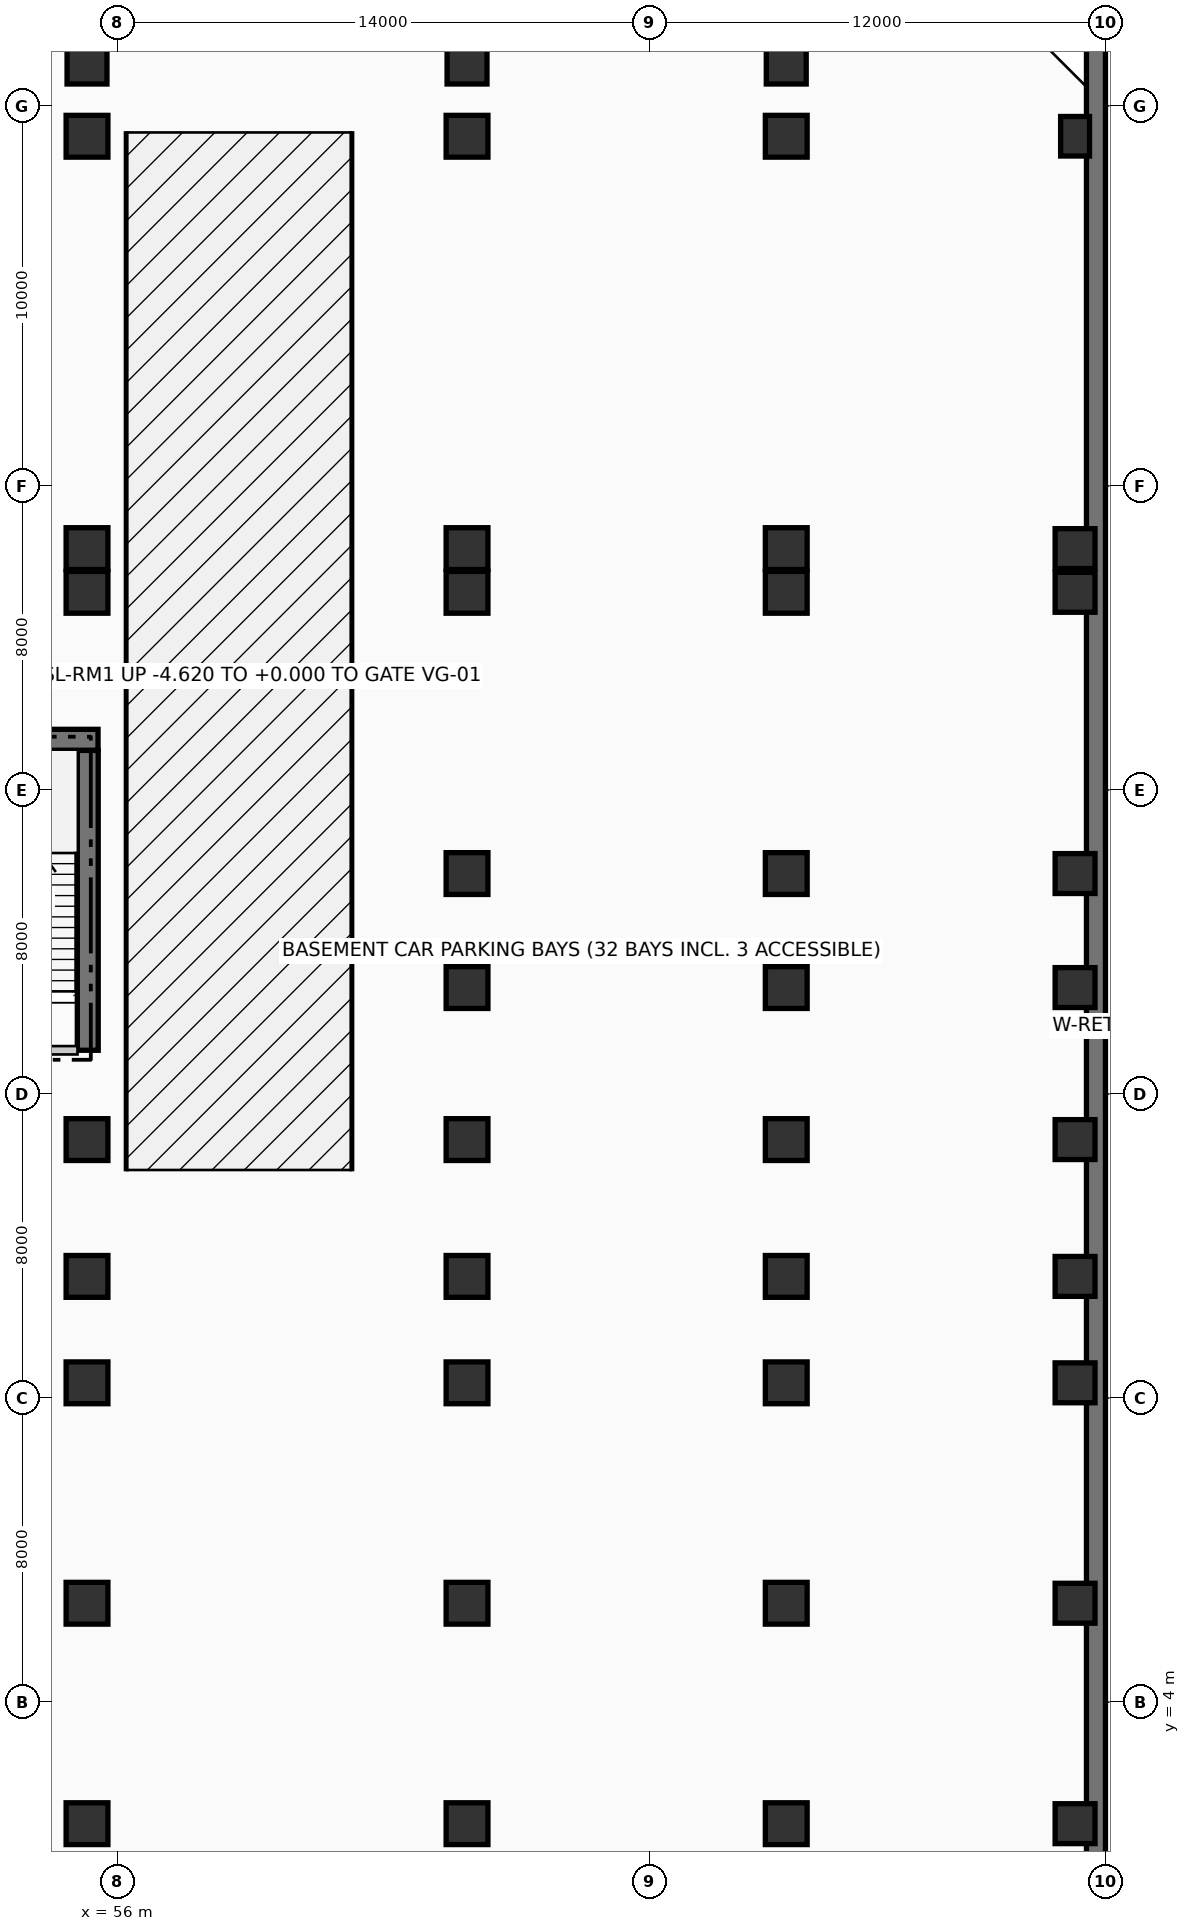
"""IFC4 building model, lengths in metres.
Left out: names, types, materials, properties, quantities, classifications, styles, units other than length and angle.
Written with IfcOpenShell. Run it as: python <this file> out.ifc"""

import sys

from ifc_helpers import new_model, si_unit, direction, frame, frame_2d, origin, origin_2d, place, context, subcontext, project, spatial, rectangle, extrude, element, save


model = new_model("IFC4")
c1 = context("Model", 3, precision=1e-05, world=origin(), true_north=direction((0.0, 1.0)))
c2 = subcontext(c1, "Body", "Model", "MODEL_VIEW")
j1 = project(units=[si_unit("LENGTHUNIT", "METRE"), si_unit("PLANEANGLEUNIT", "RADIAN")], contexts=[c1])
p1 = place(None, origin())
s1 = spatial("IfcSite", under=j1, at=p1, CompositionType="ELEMENT")
p2 = place(p1, origin())
s2 = spatial("IfcBuilding", under=s1, at=p2, CompositionType="ELEMENT")
p3 = place(p2, frame((0.0, 0.0, -4.62)))
s3 = spatial("IfcBuildingStorey", under=s2, at=p3, CompositionType="ELEMENT", Elevation=-4.62)
p4 = place(p3, frame((55.22, 21.15, 0.0), z_axis=(0.0, 0.0, 1.0), x_axis=(0.0, 1.0, 0.0)))
e1 = element("IfcWall", 1, at=p4, inside=s3, PredefinedType="SHEAR", context=c2, shape_type="SweptSolid", body=[
    extrude(rectangle(XDim=7.89, YDim=0.55, at=frame_2d((3.945, 0.0))), origin(), (0.0, 0.0, 1.0), 4.62),
])
p5 = place(p3, frame((51.25, 29.32, 0.0), z_axis=(0.0, 0.0, 1.0), x_axis=(1.0, 0.0, 0.0)))
e2 = element("IfcWall", 2, at=p5, inside=s3, PredefinedType="SHEAR", context=c2, shape_type="SweptSolid", body=[
    extrude(rectangle(XDim=4.24, YDim=0.55, at=frame_2d((2.12, 0.0))), origin(), (0.0, 0.0, 1.0), 4.62),
])
p6 = place(p3, frame((81.75, -2.0, 0.0), z_axis=(0.0, 0.0, 1.0), x_axis=(0.0, 1.0, 0.0)))
e3 = element("IfcWall", 3, at=p6, inside=s3, PredefinedType="SOLIDWALL", context=c2, shape_type="SweptSolid", body=[
    extrude(rectangle(XDim=50.0, YDim=0.5, at=frame_2d((25.0, 0.0))), origin(), (0.0, 0.0, 1.0), 4.62),
])
for number, where, z_axis, x_axis in (
    (4, (55.2, 0.8, 0.0), (0.0, 0.0, 1.0), (1.0, 0.0, 0.0)),
    (5, (55.2, 6.6, 0.0), (0.0, 0.0, 1.0), (1.0, 0.0, 0.0)),
    (6, (55.2, 12.4, 0.0), (0.0, 0.0, 1.0), (1.0, 0.0, 0.0)),
    (7, (55.2, 15.2, 0.0), (0.0, 0.0, 1.0), (1.0, 0.0, 0.0)),
    (8, (55.2, 18.8, 0.0), (0.0, 0.0, 1.0), (1.0, 0.0, 0.0)),
    (9, (55.2, 33.2, 0.0), (0.0, 0.0, 1.0), (1.0, 0.0, 0.0)),
    (10, (55.2, 34.35, 0.0), (0.0, 0.0, 1.0), (1.0, 0.0, 0.0)),
    (11, (55.2, 45.2, 0.0), (0.0, 0.0, 1.0), (1.0, 0.0, 0.0)),
):
    element("IfcColumn", number, at=place(p3, frame(where, z_axis=z_axis, x_axis=x_axis)), inside=s3, PredefinedType="COLUMN", context=c2, shape_type="SweptSolid", body=[
        extrude(rectangle(XDim=1.1, YDim=1.1, at=origin_2d()), origin(), (0.0, 0.0, 1.0), 4.62),
    ])
p7 = place(p3, frame((55.2, 47.1, 0.0), z_axis=(0.0, 0.0, 1.0), x_axis=(1.0, 0.0, 0.0)))
e12 = element("IfcColumn", 12, at=p7, inside=s3, PredefinedType="COLUMN", context=c2, shape_type="SweptSolid", body=[
    extrude(rectangle(XDim=1.05, YDim=1.05, at=origin_2d()), origin(), (0.0, 0.0, 1.0), 4.62),
])
for number, where, z_axis, x_axis in (
    (13, (65.2, 0.8, 0.0), (0.0, 0.0, 1.0), (1.0, 0.0, 0.0)),
    (14, (65.2, 6.6, 0.0), (0.0, 0.0, 1.0), (1.0, 0.0, 0.0)),
    (15, (65.2, 12.4, 0.0), (0.0, 0.0, 1.0), (1.0, 0.0, 0.0)),
    (16, (65.2, 15.2, 0.0), (0.0, 0.0, 1.0), (1.0, 0.0, 0.0)),
    (17, (65.2, 18.8, 0.0), (0.0, 0.0, 1.0), (1.0, 0.0, 0.0)),
    (18, (65.2, 22.8, 0.0), (0.0, 0.0, 1.0), (1.0, 0.0, 0.0)),
    (19, (65.2, 25.8, 0.0), (0.0, 0.0, 1.0), (1.0, 0.0, 0.0)),
    (20, (65.2, 33.2, 0.0), (0.0, 0.0, 1.0), (1.0, 0.0, 0.0)),
    (21, (65.2, 34.35, 0.0), (0.0, 0.0, 1.0), (1.0, 0.0, 0.0)),
    (22, (65.2, 45.2, 0.0), (0.0, 0.0, 1.0), (1.0, 0.0, 0.0)),
):
    element("IfcColumn", number, at=place(p3, frame(where, z_axis=z_axis, x_axis=x_axis)), inside=s3, PredefinedType="COLUMN", context=c2, shape_type="SweptSolid", body=[
        extrude(rectangle(XDim=1.1, YDim=1.1, at=origin_2d()), origin(), (0.0, 0.0, 1.0), 4.62),
    ])
p8 = place(p3, frame((65.2, 47.1, 0.0), z_axis=(0.0, 0.0, 1.0), x_axis=(1.0, 0.0, 0.0)))
e23 = element("IfcColumn", 23, at=p8, inside=s3, PredefinedType="COLUMN", context=c2, shape_type="SweptSolid", body=[
    extrude(rectangle(XDim=1.05, YDim=1.05, at=origin_2d()), origin(), (0.0, 0.0, 1.0), 4.62),
])
for number, where, z_axis, x_axis in (
    (24, (73.6, 0.8, 0.0), (0.0, 0.0, 1.0), (1.0, 0.0, 0.0)),
    (25, (73.6, 6.6, 0.0), (0.0, 0.0, 1.0), (1.0, 0.0, 0.0)),
    (26, (73.6, 12.4, 0.0), (0.0, 0.0, 1.0), (1.0, 0.0, 0.0)),
    (27, (73.6, 15.2, 0.0), (0.0, 0.0, 1.0), (1.0, 0.0, 0.0)),
    (28, (73.6, 18.8, 0.0), (0.0, 0.0, 1.0), (1.0, 0.0, 0.0)),
    (29, (73.6, 22.8, 0.0), (0.0, 0.0, 1.0), (1.0, 0.0, 0.0)),
    (30, (73.6, 25.8, 0.0), (0.0, 0.0, 1.0), (1.0, 0.0, 0.0)),
    (31, (73.6, 33.2, 0.0), (0.0, 0.0, 1.0), (1.0, 0.0, 0.0)),
    (32, (73.6, 34.35, 0.0), (0.0, 0.0, 1.0), (1.0, 0.0, 0.0)),
    (33, (73.6, 45.2, 0.0), (0.0, 0.0, 1.0), (1.0, 0.0, 0.0)),
):
    element("IfcColumn", number, at=place(p3, frame(where, z_axis=z_axis, x_axis=x_axis)), inside=s3, PredefinedType="COLUMN", context=c2, shape_type="SweptSolid", body=[
        extrude(rectangle(XDim=1.1, YDim=1.1, at=origin_2d()), origin(), (0.0, 0.0, 1.0), 4.62),
    ])
for number, where, z_axis, x_axis in (
    (34, (73.6, 47.1, 0.0), (0.0, 0.0, 1.0), (1.0, 0.0, 0.0)),
    (35, (81.2, 0.8, 0.0), (0.0, 0.0, 1.0), (1.0, 0.0, 0.0)),
    (36, (81.2, 6.6, 0.0), (0.0, 0.0, 1.0), (1.0, 0.0, 0.0)),
    (37, (81.2, 12.4, 0.0), (0.0, 0.0, 1.0), (1.0, 0.0, 0.0)),
    (38, (81.2, 15.2, 0.0), (0.0, 0.0, 1.0), (1.0, 0.0, 0.0)),
    (39, (81.2, 18.8, 0.0), (0.0, 0.0, 1.0), (1.0, 0.0, 0.0)),
    (40, (81.2, 22.8, 0.0), (0.0, 0.0, 1.0), (1.0, 0.0, 0.0)),
    (41, (81.2, 25.8, 0.0), (0.0, 0.0, 1.0), (1.0, 0.0, 0.0)),
    (42, (81.2, 33.2, 0.0), (0.0, 0.0, 1.0), (1.0, 0.0, 0.0)),
    (43, (81.2, 34.35, 0.0), (0.0, 0.0, 1.0), (1.0, 0.0, 0.0)),
):
    element("IfcColumn", number, at=place(p3, frame(where, z_axis=z_axis, x_axis=x_axis)), inside=s3, PredefinedType="COLUMN", context=c2, shape_type="SweptSolid", body=[
        extrude(rectangle(XDim=1.05, YDim=1.05, at=origin_2d()), origin(), (0.0, 0.0, 1.0), 4.62),
    ])
p9 = place(p3, frame((81.2, 45.2, 0.0), z_axis=(0.0, 0.0, 1.0), x_axis=(1.0, 0.0, 0.0)))
e44 = element("IfcColumn", 44, at=p9, inside=s3, PredefinedType="PILASTER", context=c2, shape_type="SweptSolid", body=[
    extrude(rectangle(XDim=0.76, YDim=1.04, at=origin_2d()), origin(), (0.0, 0.0, 1.0), 4.62),
])
p10 = place(p3, frame((51.8, 21.15, 0.0), z_axis=(0.0, 0.0, 1.0), x_axis=(1.0, 0.0, 0.0)))
e45 = element("IfcWall", 45, at=p10, inside=s3, PredefinedType="PARTITIONING", context=c2, shape_type="SweptSolid", body=[
    extrude(rectangle(XDim=3.15, YDim=0.22, at=frame_2d((1.575, 0.0))), origin(), (0.0, 0.0, 1.0), 4.3),
])
p11 = place(p10, frame((2.1, 0.0, 0.0), z_axis=(0.0, 0.0, 1.0), x_axis=(-1.0, 0.0, 0.0)))
e46 = element("IfcOpeningElement", 46, at=p11, cuts=e45, PredefinedType="OPENING", context=c2, shape_type="SweptSolid", body=[
    extrude(rectangle(XDim=1.05, YDim=2.15, at=frame_2d((0.525, 1.075))), frame((0.0, 0.12, 0.0), z_axis=(0.0, -1.0, 0.0), x_axis=(1.0, 0.0, 0.0)), (0.0, 0.0, 1.0), 0.24),
])
save(model, sys.argv[1])
